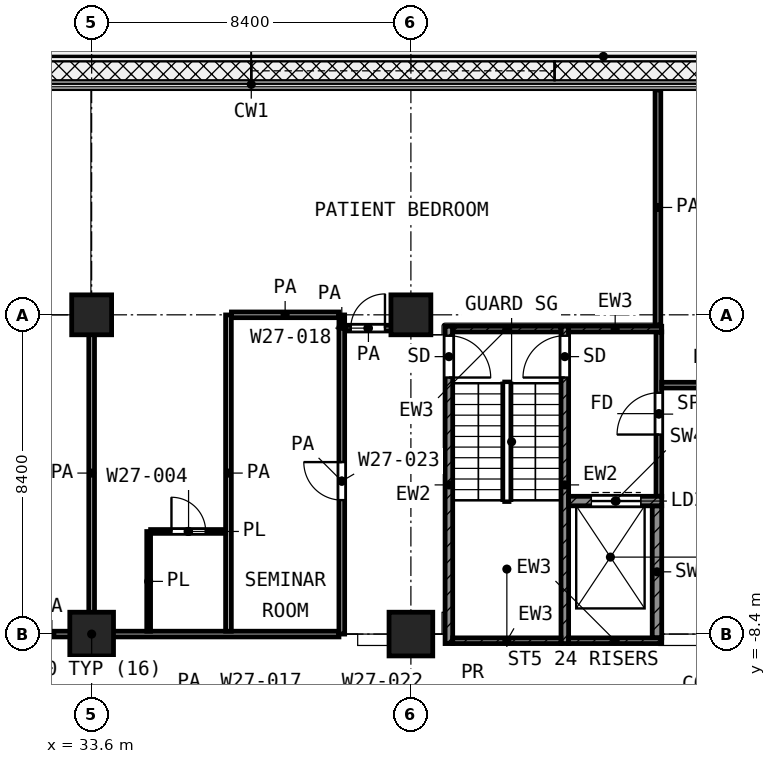
"""IFC4 building model, lengths in metres.
Left out: names, types, materials, properties, quantities, classifications, styles, units other than length and angle.
Written with IfcOpenShell. Run it as: python <this file> out.ifc"""

import sys

from ifc_helpers import new_model, si_unit, direction, frame, frame_2d, origin, origin_2d, place, context, subcontext, project, spatial, rectangle, extrude, element, fill, save


model = new_model("IFC4")
c1 = context("Model", 3, precision=1e-05, world=origin(), true_north=direction((0.0, 1.0)))
c2 = subcontext(c1, "Body", "Model", "MODEL_VIEW")
j1 = project(units=[si_unit("LENGTHUNIT", "METRE"), si_unit("PLANEANGLEUNIT", "RADIAN")], contexts=[c1])
p1 = place(None, origin())
s1 = spatial("IfcSite", under=j1, at=p1, CompositionType="ELEMENT")
p2 = place(p1, origin())
s2 = spatial("IfcBuilding", under=s1, at=p2, CompositionType="ELEMENT")
p3 = place(p2, frame((0.0, 0.0, 140.8)))
s3 = spatial("IfcBuildingStorey", under=s2, at=p3, CompositionType="ELEMENT", Elevation=140.8)
for number, where, z_axis, x_axis in (
    (1, (33.6, 0.0, 0.0), (0.0, 0.0, 1.0), (1.0, 0.0, 0.0)),
    (2, (42.0, 0.0, 0.0), (0.0, 0.0, 1.0), (1.0, 0.0, 0.0)),
):
    element("IfcColumn", number, at=place(p3, frame(where, z_axis=z_axis, x_axis=x_axis)), inside=s3, PredefinedType="COLUMN", context=c2, shape_type="SweptSolid", body=[
        extrude(rectangle(XDim=1.05, YDim=1.05, at=origin_2d()), origin(), (0.0, 0.0, 1.0), 4.2),
    ])
for number, where, z_axis, x_axis in (
    (3, (33.6, -8.4, 0.0), (0.0, 0.0, 1.0), (1.0, 0.0, 0.0)),
    (4, (42.0, -8.4, 0.0), (0.0, 0.0, 1.0), (1.0, 0.0, 0.0)),
):
    element("IfcColumn", number, at=place(p3, frame(where, z_axis=z_axis, x_axis=x_axis)), inside=s3, PredefinedType="COLUMN", context=c2, shape_type="SweptSolid", body=[
        extrude(rectangle(XDim=1.15, YDim=1.15, at=origin_2d()), origin(), (0.0, 0.0, 1.0), 4.2),
    ])
p4 = place(p3, frame((43.0, -8.65, 0.0), z_axis=(0.0, 0.0, 1.0), x_axis=(0.0, 1.0, 0.0)))
e5 = element("IfcWall", 5, at=p4, inside=s3, PredefinedType="SHEAR", context=c2, shape_type="SweptSolid", body=[
    extrude(rectangle(XDim=8.35, YDim=0.2, at=frame_2d((4.175, 0.0))), origin(), (0.0, 0.0, 1.0), 3.6),
])
p5 = place(p4, frame((7.0, 0.0, 0.0)))
e6 = element("IfcOpeningElement", 6, at=p5, cuts=e5, PredefinedType="OPENING", context=c2, shape_type="SweptSolid", body=[
    extrude(rectangle(XDim=1.1, YDim=2.1, at=frame_2d((0.55, 1.05))), frame((0.0, 0.11, 0.0), z_axis=(0.0, -1.0, 0.0), x_axis=(1.0, 0.0, 0.0)), (0.0, 0.0, 1.0), 0.22),
])
p6 = place(p3, frame((46.05, -8.65, 0.0), z_axis=(0.0, 0.0, 1.0), x_axis=(0.0, 1.0, 0.0)))
e7 = element("IfcWall", 7, at=p6, inside=s3, PredefinedType="SHEAR", context=c2, shape_type="SweptSolid", body=[
    extrude(rectangle(XDim=8.35, YDim=0.2, at=frame_2d((4.175, 0.0))), origin(), (0.0, 0.0, 1.0), 3.6),
])
p7 = place(p6, frame((7.0, 0.0, 0.0)))
e8 = element("IfcOpeningElement", 8, at=p7, cuts=e7, PredefinedType="OPENING", context=c2, shape_type="SweptSolid", body=[
    extrude(rectangle(XDim=1.1, YDim=2.1, at=frame_2d((0.55, 1.05))), frame((0.0, 0.11, 0.0), z_axis=(0.0, -1.0, 0.0), x_axis=(1.0, 0.0, 0.0)), (0.0, 0.0, 1.0), 0.22),
])
p8 = place(p3, frame((43.1, -0.375, 0.0), z_axis=(0.0, 0.0, 1.0), x_axis=(1.0, 0.0, 0.0)))
e9 = element("IfcWall", 9, at=p8, inside=s3, PredefinedType="SHEAR", context=c2, shape_type="SweptSolid", body=[
    extrude(rectangle(XDim=2.85, YDim=0.15, at=frame_2d((1.425, 0.0))), origin(), (0.0, 0.0, 1.0), 3.6),
])
p9 = place(p3, frame((46.15, -0.375, 0.0), z_axis=(0.0, 0.0, 1.0), x_axis=(1.0, 0.0, 0.0)))
e10 = element("IfcWall", 10, at=p9, inside=s3, PredefinedType="SHEAR", context=c2, shape_type="SweptSolid", body=[
    extrude(rectangle(XDim=2.45, YDim=0.15, at=frame_2d((1.225, 0.0))), origin(), (0.0, 0.0, 1.0), 3.6),
])
p10 = place(p3, frame((43.1, -8.575, 0.0), z_axis=(0.0, 0.0, 1.0), x_axis=(1.0, 0.0, 0.0)))
e11 = element("IfcWall", 11, at=p10, inside=s3, PredefinedType="SHEAR", context=c2, shape_type="SweptSolid", body=[
    extrude(rectangle(XDim=2.85, YDim=0.15, at=frame_2d((1.425, 0.0))), origin(), (0.0, 0.0, 1.0), 3.6),
])
p11 = place(p3, frame((46.15, -8.575, 0.0), z_axis=(0.0, 0.0, 1.0), x_axis=(1.0, 0.0, 0.0)))
e12 = element("IfcWall", 12, at=p11, inside=s3, PredefinedType="SHEAR", context=c2, shape_type="SweptSolid", body=[
    extrude(rectangle(XDim=2.45, YDim=0.15, at=frame_2d((1.225, 0.0))), origin(), (0.0, 0.0, 1.0), 3.6),
])
p12 = place(p3, frame((46.15, -4.9, 0.0), z_axis=(0.0, 0.0, 1.0), x_axis=(1.0, 0.0, 0.0)))
e13 = element("IfcWall", 13, at=p12, inside=s3, PredefinedType="SHEAR", context=c2, shape_type="SweptSolid", body=[
    extrude(rectangle(XDim=2.45, YDim=0.25, at=frame_2d((1.225, 0.0))), origin(), (0.0, 0.0, 1.0), 3.6),
])
p13 = place(p12, frame((0.6, 0.0, 0.0)))
e14 = element("IfcOpeningElement", 14, at=p13, cuts=e13, PredefinedType="OPENING", context=c2, shape_type="SweptSolid", body=[
    extrude(rectangle(XDim=1.3, YDim=2.1, at=frame_2d((0.65, 1.05))), frame((0.0, 0.135, 0.0), z_axis=(0.0, -1.0, 0.0), x_axis=(1.0, 0.0, 0.0)), (0.0, 0.0, 1.0), 0.27),
])
p14 = place(p3, frame((48.475, -8.5, 0.0), z_axis=(0.0, 0.0, 1.0), x_axis=(0.0, 1.0, 0.0)))
e15 = element("IfcWall", 15, at=p14, inside=s3, PredefinedType="SHEAR", context=c2, shape_type="SweptSolid", body=[
    extrude(rectangle(XDim=3.475, YDim=0.25, at=frame_2d((1.738, 0.0))), origin(), (0.0, 0.0, 1.0), 3.6),
])
p15 = place(p3, frame((48.525, -4.775, 0.0), z_axis=(0.0, 0.0, 1.0), x_axis=(0.0, 1.0, 0.0)))
e16 = element("IfcWall", 16, at=p15, inside=s3, PredefinedType="PARTITIONING", context=c2, shape_type="SweptSolid", body=[
    extrude(rectangle(XDim=4.325, YDim=0.15, at=frame_2d((2.163, 0.0))), origin(), (0.0, 0.0, 1.0), 3.6),
])
p16 = place(p15, frame((1.625, 0.0, 0.0)))
e17 = element("IfcOpeningElement", 17, at=p16, cuts=e16, PredefinedType="OPENING", context=c2, shape_type="SweptSolid", body=[
    extrude(rectangle(XDim=1.1, YDim=2.1, at=frame_2d((0.55, 1.05))), frame((0.0, 0.085, 0.0), z_axis=(0.0, -1.0, 0.0), x_axis=(1.0, 0.0, 0.0)), (0.0, 0.0, 1.0), 0.17),
])
p17 = place(p3, frame((35.151, -5.7, 0.0), z_axis=(0.0, 0.0, 1.0), x_axis=(1.0, 0.0, 0.0)))
e18 = element("IfcWall", 18, at=p17, inside=s3, PredefinedType="PARTITIONING", context=c2, shape_type="SweptSolid", body=[
    extrude(rectangle(XDim=1.974, YDim=0.1, at=frame_2d((0.987, 0.0))), origin(), (0.0, 0.0, 1.0), 3.6),
])
p18 = place(p17, frame((0.549, 0.0, 0.0)))
e19 = element("IfcOpeningElement", 19, at=p18, cuts=e18, PredefinedType="OPENING", context=c2, shape_type="SweptSolid", body=[
    extrude(rectangle(XDim=0.9, YDim=2.1, at=frame_2d((0.45, 1.05))), frame((0.0, 0.06, 0.0), z_axis=(0.0, -1.0, 0.0), x_axis=(1.0, 0.0, 0.0)), (0.0, 0.0, 1.0), 0.12),
])
p19 = place(p3, frame((35.1, -8.325, 0.0), z_axis=(0.0, 0.0, 1.0), x_axis=(0.0, 1.0, 0.0)))
e20 = element("IfcWall", 20, at=p19, inside=s3, PredefinedType="PARTITIONING", context=c2, shape_type="SweptSolid", body=[
    extrude(rectangle(XDim=2.623, YDim=0.1, at=frame_2d((1.312, 0.0))), origin(), (0.0, 0.0, 1.0), 3.6),
])
p20 = place(p3, frame((25.0, -8.4, 0.0), z_axis=(0.0, 0.0, 1.0), x_axis=(1.0, 0.0, 0.0)))
e21 = element("IfcWall", 21, at=p20, inside=s3, PredefinedType="PARTITIONING", context=c2, shape_type="SweptSolid", body=[
    extrude(rectangle(XDim=15.107, YDim=0.15, at=frame_2d((7.553, 0.0))), origin(), (0.0, 0.0, 1.0), 3.6),
])
p21 = place(p20, frame((3.8, 0.0, 0.0)))
e22 = element("IfcOpeningElement", 22, at=p21, cuts=e21, PredefinedType="OPENING", context=c2, shape_type="SweptSolid", body=[
    extrude(rectangle(XDim=1.2, YDim=2.1, at=frame_2d((0.6, 1.05))), frame((0.0, 0.085, 0.0), z_axis=(0.0, -1.0, 0.0), x_axis=(1.0, 0.0, 0.0)), (0.0, 0.0, 1.0), 0.17),
])
p22 = place(p3, frame((48.6, -1.85, 0.0), z_axis=(0.0, 0.0, 1.0), x_axis=(1.0, 0.0, 0.0)))
e23 = element("IfcWall", 23, at=p22, inside=s3, PredefinedType="PARTITIONING", context=c2, shape_type="SweptSolid", body=[
    extrude(rectangle(XDim=2.247, YDim=0.15, at=frame_2d((1.124, 0.0))), origin(), (0.0, 0.0, 1.0), 3.6),
])
p23 = place(p3, frame((40.277, -0.35, 0.0), z_axis=(0.0, 0.0, 1.0), x_axis=(1.0, 0.0, 0.0)))
e24 = element("IfcWall", 24, at=p23, inside=s3, PredefinedType="PARTITIONING", context=c2, shape_type="SweptSolid", body=[
    extrude(rectangle(XDim=1.211, YDim=0.15, at=frame_2d((0.605, 0.0))), origin(), (0.0, 0.0, 1.0), 3.6),
])
p24 = place(p23, frame((0.141, 0.0, 0.0)))
e25 = element("IfcOpeningElement", 25, at=p24, cuts=e24, PredefinedType="OPENING", context=c2, shape_type="SweptSolid", body=[
    extrude(rectangle(XDim=0.9, YDim=2.1, at=frame_2d((0.45, 1.05))), frame((0.0, 0.085, 0.0), z_axis=(0.0, -1.0, 0.0), x_axis=(1.0, 0.0, 0.0)), (0.0, 0.0, 1.0), 0.17),
])
p25 = place(p3, frame((37.278, 0.0, 0.0), z_axis=(0.0, 0.0, 1.0), x_axis=(1.0, 0.0, 0.0)))
e26 = element("IfcWall", 26, at=p25, inside=s3, PredefinedType="PARTITIONING", context=c2, shape_type="SweptSolid", body=[
    extrude(rectangle(XDim=2.826, YDim=0.15, at=frame_2d((1.413, 0.0))), origin(), (0.0, 0.0, 1.0), 3.6),
])
for number, where, z_axis, x_axis in (
    (27, (33.6, -8.325, 0.0), (0.0, 0.0, 1.0), (0.0, 1.0, 0.0)),
    (28, (37.2, -8.325, 0.0), (0.0, 0.0, 1.0), (0.0, 1.0, 0.0)),
):
    element("IfcWall", number, at=place(p3, frame(where, z_axis=z_axis, x_axis=x_axis)), inside=s3, PredefinedType="PARTITIONING", context=c2, shape_type="SweptSolid", body=[
        extrude(rectangle(XDim=8.322, YDim=0.15, at=frame_2d((4.161, 0.0))), origin(), (0.0, 0.0, 1.0), 3.6),
    ])
p26 = place(p3, frame((40.182, -8.4, 0.0), z_axis=(0.0, 0.0, 1.0), x_axis=(0.0, 1.0, 0.0)))
e29 = element("IfcWall", 29, at=p26, inside=s3, PredefinedType="PARTITIONING", context=c2, shape_type="SweptSolid", body=[
    extrude(rectangle(XDim=8.05, YDim=0.15, at=frame_2d((4.025, 0.0))), origin(), (0.0, 0.0, 1.0), 3.6),
])
p27 = place(p26, frame((3.525, 0.0, 0.0)))
e30 = element("IfcOpeningElement", 30, at=p27, cuts=e29, PredefinedType="OPENING", context=c2, shape_type="SweptSolid", body=[
    extrude(rectangle(XDim=1.0, YDim=2.1, at=frame_2d((0.5, 1.05))), frame((0.0, 0.085, 0.0), z_axis=(0.0, -1.0, 0.0), x_axis=(1.0, 0.0, 0.0)), (0.0, 0.0, 1.0), 0.17),
])
p28 = place(p3, frame((40.182, -0.33, 0.0), z_axis=(0.0, 0.0, 1.0), x_axis=(0.0, 1.0, 0.0)))
e31 = element("IfcWall", 31, at=p28, inside=s3, PredefinedType="PARTITIONING", context=c2, shape_type="SweptSolid", body=[
    extrude(rectangle(XDim=0.327, YDim=0.15, at=frame_2d((0.164, 0.0))), origin(), (0.0, 0.0, 1.0), 3.6),
])
p29 = place(p3, frame((48.5, -0.27, 0.0), z_axis=(0.0, 0.0, 1.0), x_axis=(0.0, 1.0, 0.0)))
e32 = element("IfcWall", 32, at=p29, inside=s3, PredefinedType="PARTITIONING", context=c2, shape_type="SweptSolid", body=[
    extrude(rectangle(XDim=6.19, YDim=0.15, at=frame_2d((3.095, 0.0))), origin(), (0.0, 0.0, 1.0), 3.6),
])
p30 = place(p5, frame((1.1, 0.0, 0.0), z_axis=(0.0, 0.0, 1.0), x_axis=(-1.0, 0.0, 0.0)))
e33 = element("IfcDoor", 33, at=p30, inside=s3, OperationType="SINGLE_SWING_LEFT", PredefinedType="DOOR", context=c2, shape_type="SweptSolid", body=[
    extrude(rectangle(XDim=1.1, YDim=2.1, at=frame_2d((0.55, 1.05))), frame((0.0, 0.025, 0.0), z_axis=(0.0, -1.0, 0.0), x_axis=(1.0, 0.0, 0.0)), (0.0, 0.0, 1.0), 0.05),
])
fill(e6, e33)
p31 = place(p7, origin())
e34 = element("IfcDoor", 34, at=p31, inside=s3, OperationType="SINGLE_SWING_LEFT", PredefinedType="DOOR", context=c2, shape_type="SweptSolid", body=[
    extrude(rectangle(XDim=1.1, YDim=2.1, at=frame_2d((0.55, 1.05))), frame((0.0, 0.025, 0.0), z_axis=(0.0, -1.0, 0.0), x_axis=(1.0, 0.0, 0.0)), (0.0, 0.0, 1.0), 0.05),
])
fill(e8, e34)
p32 = place(p13, origin())
e35 = element("IfcDoor", 35, at=p32, inside=s3, OperationType="DOUBLE_DOOR_SLIDING", PredefinedType="DOOR", context=c2, shape_type="SweptSolid", body=[
    extrude(rectangle(XDim=1.3, YDim=2.1, at=frame_2d((0.65, 1.05))), frame((0.0, 0.025, 0.0), z_axis=(0.0, -1.0, 0.0), x_axis=(1.0, 0.0, 0.0)), (0.0, 0.0, 1.0), 0.05),
])
fill(e14, e35)
p33 = place(p16, origin())
e36 = element("IfcDoor", 36, at=p33, inside=s3, OperationType="SINGLE_SWING_LEFT", PredefinedType="DOOR", context=c2, shape_type="SweptSolid", body=[
    extrude(rectangle(XDim=1.1, YDim=2.1, at=frame_2d((0.55, 1.05))), frame((0.0, 0.025, 0.0), z_axis=(0.0, -1.0, 0.0), x_axis=(1.0, 0.0, 0.0)), (0.0, 0.0, 1.0), 0.05),
])
fill(e17, e36)
p34 = place(p24, origin())
e37 = element("IfcDoor", 37, at=p34, inside=s3, OperationType="SINGLE_SWING_RIGHT", PredefinedType="DOOR", context=c2, shape_type="SweptSolid", body=[
    extrude(rectangle(XDim=0.9, YDim=2.1, at=frame_2d((0.45, 1.05))), frame((0.0, 0.025, 0.0), z_axis=(0.0, -1.0, 0.0), x_axis=(1.0, 0.0, 0.0)), (0.0, 0.0, 1.0), 0.05),
])
fill(e25, e37)
p35 = place(p18, origin())
e38 = element("IfcDoor", 38, at=p35, inside=s3, OperationType="SINGLE_SWING_LEFT", PredefinedType="DOOR", context=c2, shape_type="SweptSolid", body=[
    extrude(rectangle(XDim=0.9, YDim=2.1, at=frame_2d((0.45, 1.05))), frame((0.0, 0.025, 0.0), z_axis=(0.0, -1.0, 0.0), x_axis=(1.0, 0.0, 0.0)), (0.0, 0.0, 1.0), 0.05),
])
fill(e19, e38)
p36 = place(p27, origin())
e39 = element("IfcDoor", 39, at=p36, inside=s3, OperationType="SINGLE_SWING_RIGHT", PredefinedType="DOOR", context=c2, shape_type="SweptSolid", body=[
    extrude(rectangle(XDim=1.0, YDim=2.1, at=frame_2d((0.5, 1.05))), frame((0.0, 0.025, 0.0), z_axis=(0.0, -1.0, 0.0), x_axis=(1.0, 0.0, 0.0)), (0.0, 0.0, 1.0), 0.05),
])
fill(e30, e39)
save(model, sys.argv[1])
